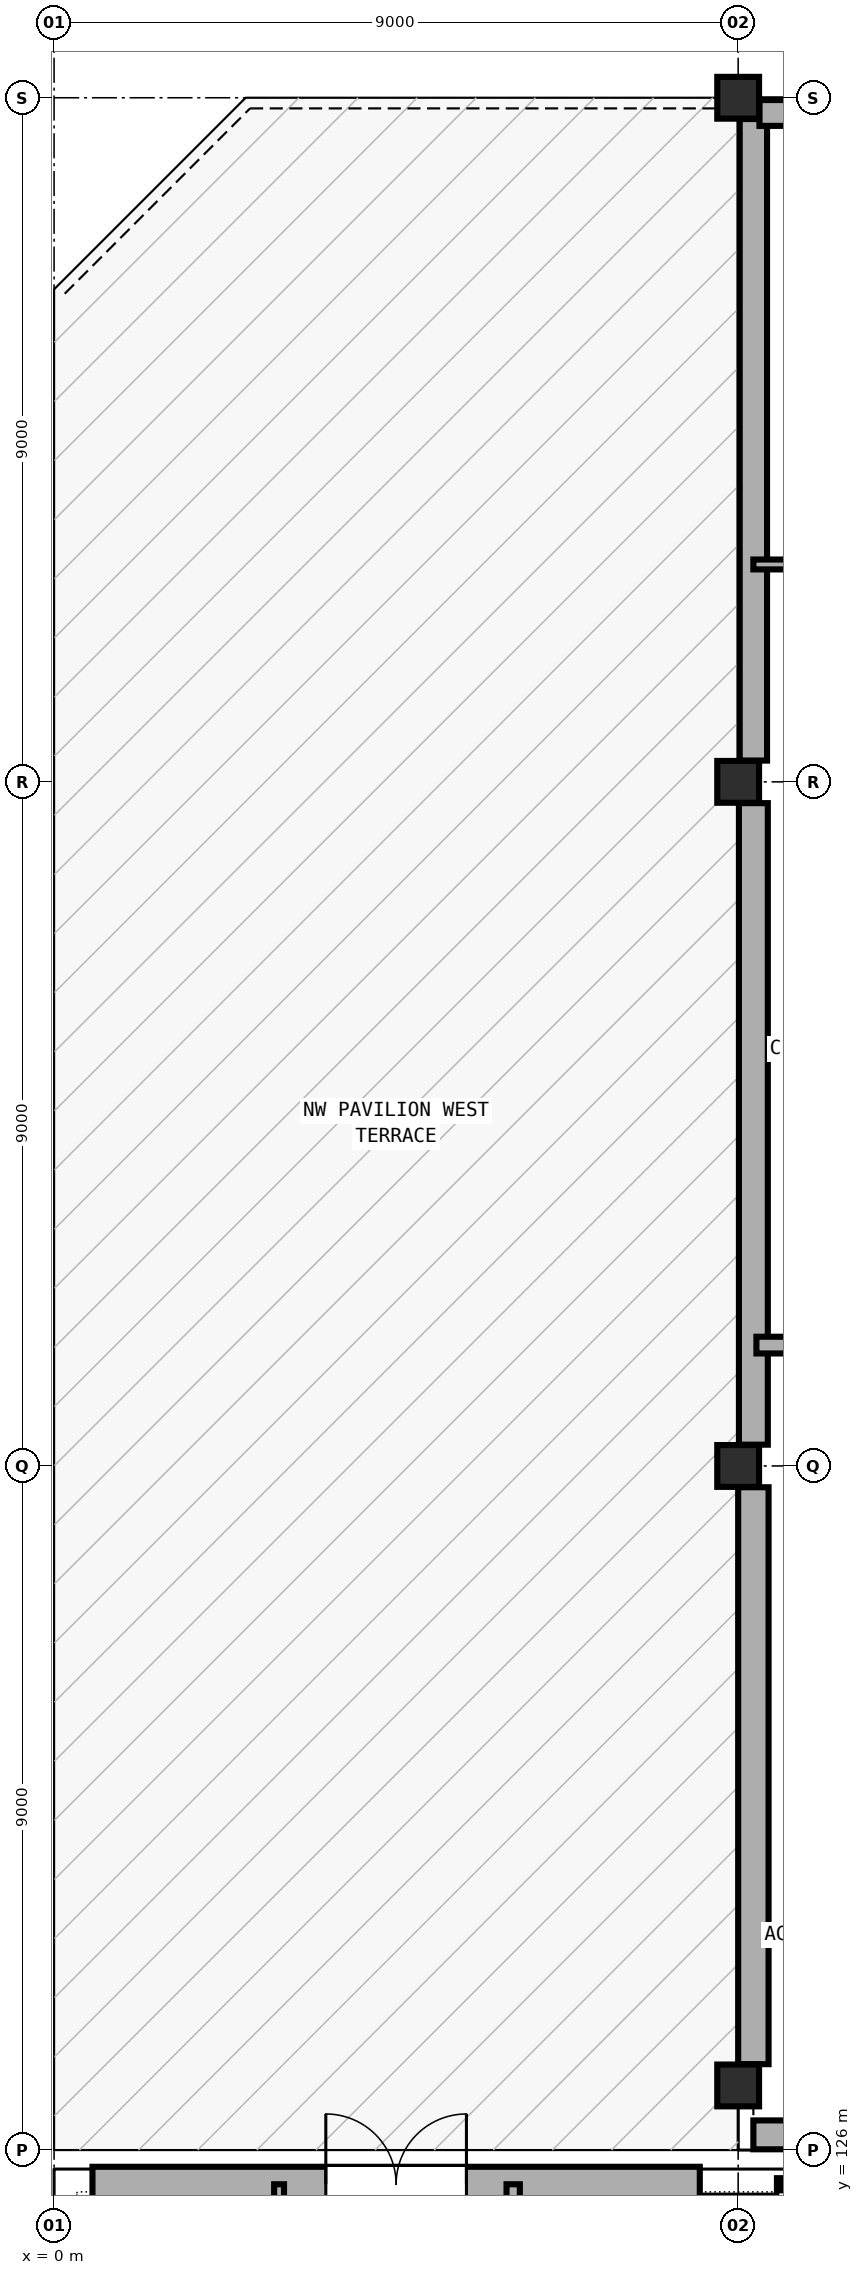
"""IFC4 building model, lengths in metres.
Left out: names, types, materials, properties, quantities, classifications, styles, units other than length and angle.
Written with IfcOpenShell. Run it as: python <this file> out.ifc"""

import sys

from ifc_helpers import new_model, si_unit, direction, frame, frame_2d, origin, origin_2d, place, context, subcontext, project, spatial, rectangle, extrude, element, fill, save


model = new_model("IFC4")
c1 = context("Model", 3, precision=1e-05, world=origin(), true_north=direction((0.0, 1.0)))
c2 = subcontext(c1, "Body", "Model", "MODEL_VIEW")
j1 = project(units=[si_unit("LENGTHUNIT", "METRE"), si_unit("PLANEANGLEUNIT", "RADIAN")], contexts=[c1])
p1 = place(None, origin())
s1 = spatial("IfcSite", under=j1, at=p1, CompositionType="ELEMENT")
p2 = place(p1, origin())
s2 = spatial("IfcBuilding", under=s1, at=p2, CompositionType="ELEMENT")
p3 = place(p2, frame((0.0, 0.0, 9.6)))
s3 = spatial("IfcBuildingStorey", under=s2, at=p3, CompositionType="ELEMENT", Elevation=9.6)
for number, where, z_axis, x_axis in (
    (1, (9.0, 126.85, 0.0), (0.0, 0.0, 1.0), (1.0, 0.0, 0.0)),
    (2, (9.0, 135.0, 0.0), (0.0, 0.0, 1.0), (1.0, 0.0, 0.0)),
    (3, (9.0, 144.0, 0.0), (0.0, 0.0, 1.0), (1.0, 0.0, 0.0)),
    (4, (9.0, 153.0, 0.0), (0.0, 0.0, 1.0), (1.0, 0.0, 0.0)),
):
    element("IfcColumn", number, at=place(p3, frame(where, z_axis=z_axis, x_axis=x_axis)), inside=s3, PredefinedType="COLUMN", context=c2, shape_type="SweptSolid", body=[
        extrude(rectangle(XDim=0.55, YDim=0.55, at=origin_2d()), origin(), (0.0, 0.0, 1.0), 4.8),
    ])
p4 = place(p3, frame((0.505, 125.55, 0.0), z_axis=(0.0, 0.0, 1.0), x_axis=(1.0, 0.0, 0.0)))
e5 = element("IfcWall", 5, at=p4, inside=s3, PredefinedType="SOLIDWALL", context=c2, shape_type="SweptSolid", body=[
    extrude(rectangle(XDim=7.99, YDim=0.46, at=frame_2d((3.995, 0.0))), origin(), (0.0, 0.0, 1.0), 3.58),
])
p5 = place(p4, frame((3.07, 0.0, 0.0)))
e6 = element("IfcOpeningElement", 6, at=p5, cuts=e5, PredefinedType="OPENING", context=c2, shape_type="SweptSolid", body=[
    extrude(rectangle(XDim=1.85, YDim=2.25, at=frame_2d((0.925, 1.125))), frame((0.0, 0.24, 0.0), z_axis=(0.0, -1.0, 0.0), x_axis=(1.0, 0.0, 0.0)), (0.0, 0.0, 1.0), 0.48),
])
p6 = place(p3, frame((9.2, 127.13, 0.0), z_axis=(0.0, 0.0, 1.0), x_axis=(0.0, 1.0, 0.0)))
e7 = element("IfcWall", 7, at=p6, inside=s3, PredefinedType="SOLIDWALL", context=c2, shape_type="SweptSolid", body=[
    extrude(rectangle(XDim=7.59, YDim=0.4, at=frame_2d((3.795, 0.0))), origin(), (0.0, 0.0, 1.0), 3.58),
])
p7 = place(p3, frame((9.2, 135.28, 0.0), z_axis=(0.0, 0.0, 1.0), x_axis=(0.0, 1.0, 0.0)))
e8 = element("IfcWall", 8, at=p7, inside=s3, PredefinedType="SOLIDWALL", context=c2, shape_type="SweptSolid", body=[
    extrude(rectangle(XDim=8.44, YDim=0.38, at=frame_2d((4.22, 0.0))), origin(), (0.0, 0.0, 1.0), 3.58),
])
p8 = place(p3, frame((9.2, 144.28, 0.0), z_axis=(0.0, 0.0, 1.0), x_axis=(0.0, 1.0, 0.0)))
e9 = element("IfcWall", 9, at=p8, inside=s3, PredefinedType="SOLIDWALL", context=c2, shape_type="SweptSolid", body=[
    extrude(rectangle(XDim=8.44, YDim=0.36, at=frame_2d((4.22, 0.0))), origin(), (0.0, 0.0, 1.0), 3.58),
])
p9 = place(p3, frame((9.28, 152.8, 0.0), z_axis=(0.0, 0.0, 1.0), x_axis=(1.0, 0.0, 0.0)))
e10 = element("IfcWall", 10, at=p9, inside=s3, PredefinedType="SOLIDWALL", context=c2, shape_type="SweptSolid", body=[
    extrude(rectangle(XDim=8.44, YDim=0.34, at=frame_2d((4.22, 0.0))), origin(), (0.0, 0.0, 1.0), 3.58),
])
p10 = place(p9, frame((3.52, 0.0, 0.9)))
e11 = element("IfcOpeningElement", 11, at=p10, cuts=e10, PredefinedType="OPENING", context=c2, shape_type="SweptSolid", body=[
    extrude(rectangle(XDim=1.4, YDim=1.55, at=frame_2d((0.7, 0.775))), frame((0.0, 0.18, 0.0), z_axis=(0.0, -1.0, 0.0), x_axis=(1.0, 0.0, 0.0)), (0.0, 0.0, 1.0), 0.36),
])
p11 = place(p3, frame((18.12, 126.2, 0.0), z_axis=(0.0, 0.0, 1.0), x_axis=(-1.0, 0.0, 0.0)))
e12 = element("IfcWall", 12, at=p11, inside=s3, PredefinedType="SOLIDWALL", context=c2, shape_type="SweptSolid", body=[
    extrude(rectangle(XDim=8.92, YDim=0.38, at=frame_2d((4.46, 0.0))), origin(), (0.0, 0.0, 1.0), 3.58),
])
p12 = place(p11, frame((3.26, 0.0, 0.9)))
e13 = element("IfcOpeningElement", 13, at=p12, cuts=e12, PredefinedType="OPENING", context=c2, shape_type="SweptSolid", body=[
    extrude(rectangle(XDim=2.4, YDim=2.05, at=frame_2d((1.2, 1.025))), frame((0.0, 0.2, 0.0), z_axis=(0.0, -1.0, 0.0), x_axis=(1.0, 0.0, 0.0)), (0.0, 0.0, 1.0), 0.4),
])
p13 = place(p3, frame((6.04, 125.55, 0.0), z_axis=(0.0, 0.0, 1.0), x_axis=(0.0, -1.0, 0.0)))
e14 = element("IfcWall", 14, at=p13, inside=s3, PredefinedType="PARTITIONING", context=c2, shape_type="SweptSolid", body=[
    extrude(rectangle(XDim=22.78, YDim=0.175, at=frame_2d((11.39, 0.0))), origin(), (0.0, 0.0, 1.0), 3.56),
])
p14 = place(p13, frame((11.892, 0.0, 0.0)))
e15 = element("IfcOpeningElement", 15, at=p14, cuts=e14, PredefinedType="OPENING", context=c2, shape_type="SweptSolid", body=[
    extrude(rectangle(XDim=1.7, YDim=2.2, at=frame_2d((0.85, 1.1))), frame((0.0, 0.097, 0.0), z_axis=(0.0, -1.0, 0.0), x_axis=(1.0, 0.0, 0.0)), (0.0, 0.0, 1.0), 0.195),
])
p15 = place(p3, frame((2.96, 107.658, 0.0), z_axis=(0.0, 0.0, 1.0), x_axis=(0.0, 1.0, 0.0)))
e16 = element("IfcWall", 16, at=p15, inside=s3, PredefinedType="PARTITIONING", context=c2, shape_type="SweptSolid", body=[
    extrude(rectangle(XDim=17.892, YDim=0.13, at=frame_2d((8.946, 0.0))), origin(), (0.0, 0.0, 1.0), 3.56),
])
p16 = place(p15, frame((5.229, 0.0, 0.0)))
e17 = element("IfcOpeningElement", 17, at=p16, cuts=e16, PredefinedType="OPENING", context=c2, shape_type="SweptSolid", body=[
    extrude(rectangle(XDim=1.08, YDim=2.18, at=frame_2d((0.54, 1.09))), frame((0.0, 0.075, 0.0), z_axis=(0.0, -1.0, 0.0), x_axis=(1.0, 0.0, 0.0)), (0.0, 0.0, 1.0), 0.15),
])
p17 = place(p3, frame((12.08, 146.86, 0.0), z_axis=(0.0, 0.0, 1.0), x_axis=(-1.0, 0.0, 0.0)))
e18 = element("IfcWall", 18, at=p17, inside=s3, PredefinedType="PARTITIONING", context=c2, shape_type="SweptSolid", body=[
    extrude(rectangle(XDim=2.88, YDim=0.13, at=frame_2d((1.44, 0.0))), origin(), (0.0, 0.0, 1.0), 3.56),
])
p18 = place(p17, frame((0.88, 0.0, 0.0)))
e19 = element("IfcOpeningElement", 19, at=p18, cuts=e18, PredefinedType="OPENING", context=c2, shape_type="SweptSolid", body=[
    extrude(rectangle(XDim=1.12, YDim=2.22, at=frame_2d((0.56, 1.11))), frame((0.0, 0.075, 0.0), z_axis=(0.0, -1.0, 0.0), x_axis=(1.0, 0.0, 0.0)), (0.0, 0.0, 1.0), 0.15),
])
p19 = place(p3, frame((12.04, 136.59, 0.0), z_axis=(0.0, 0.0, 1.0), x_axis=(-1.0, 0.0, 0.0)))
e20 = element("IfcWall", 20, at=p19, inside=s3, PredefinedType="PARTITIONING", context=c2, shape_type="SweptSolid", body=[
    extrude(rectangle(XDim=2.8, YDim=0.22, at=frame_2d((1.4, 0.0))), origin(), (0.0, 0.0, 1.0), 3.56),
])
p20 = place(p5, origin())
e21 = element("IfcDoor", 21, at=p20, inside=s3, OperationType="DOUBLE_DOOR_SINGLE_SWING", PredefinedType="DOOR", context=c2, shape_type="SweptSolid", body=[
    extrude(rectangle(XDim=1.85, YDim=2.25, at=frame_2d((0.925, 1.125))), frame((0.0, 0.025, 0.0), z_axis=(0.0, -1.0, 0.0), x_axis=(1.0, 0.0, 0.0)), (0.0, 0.0, 1.0), 0.05),
])
fill(e6, e21)
save(model, sys.argv[1])
